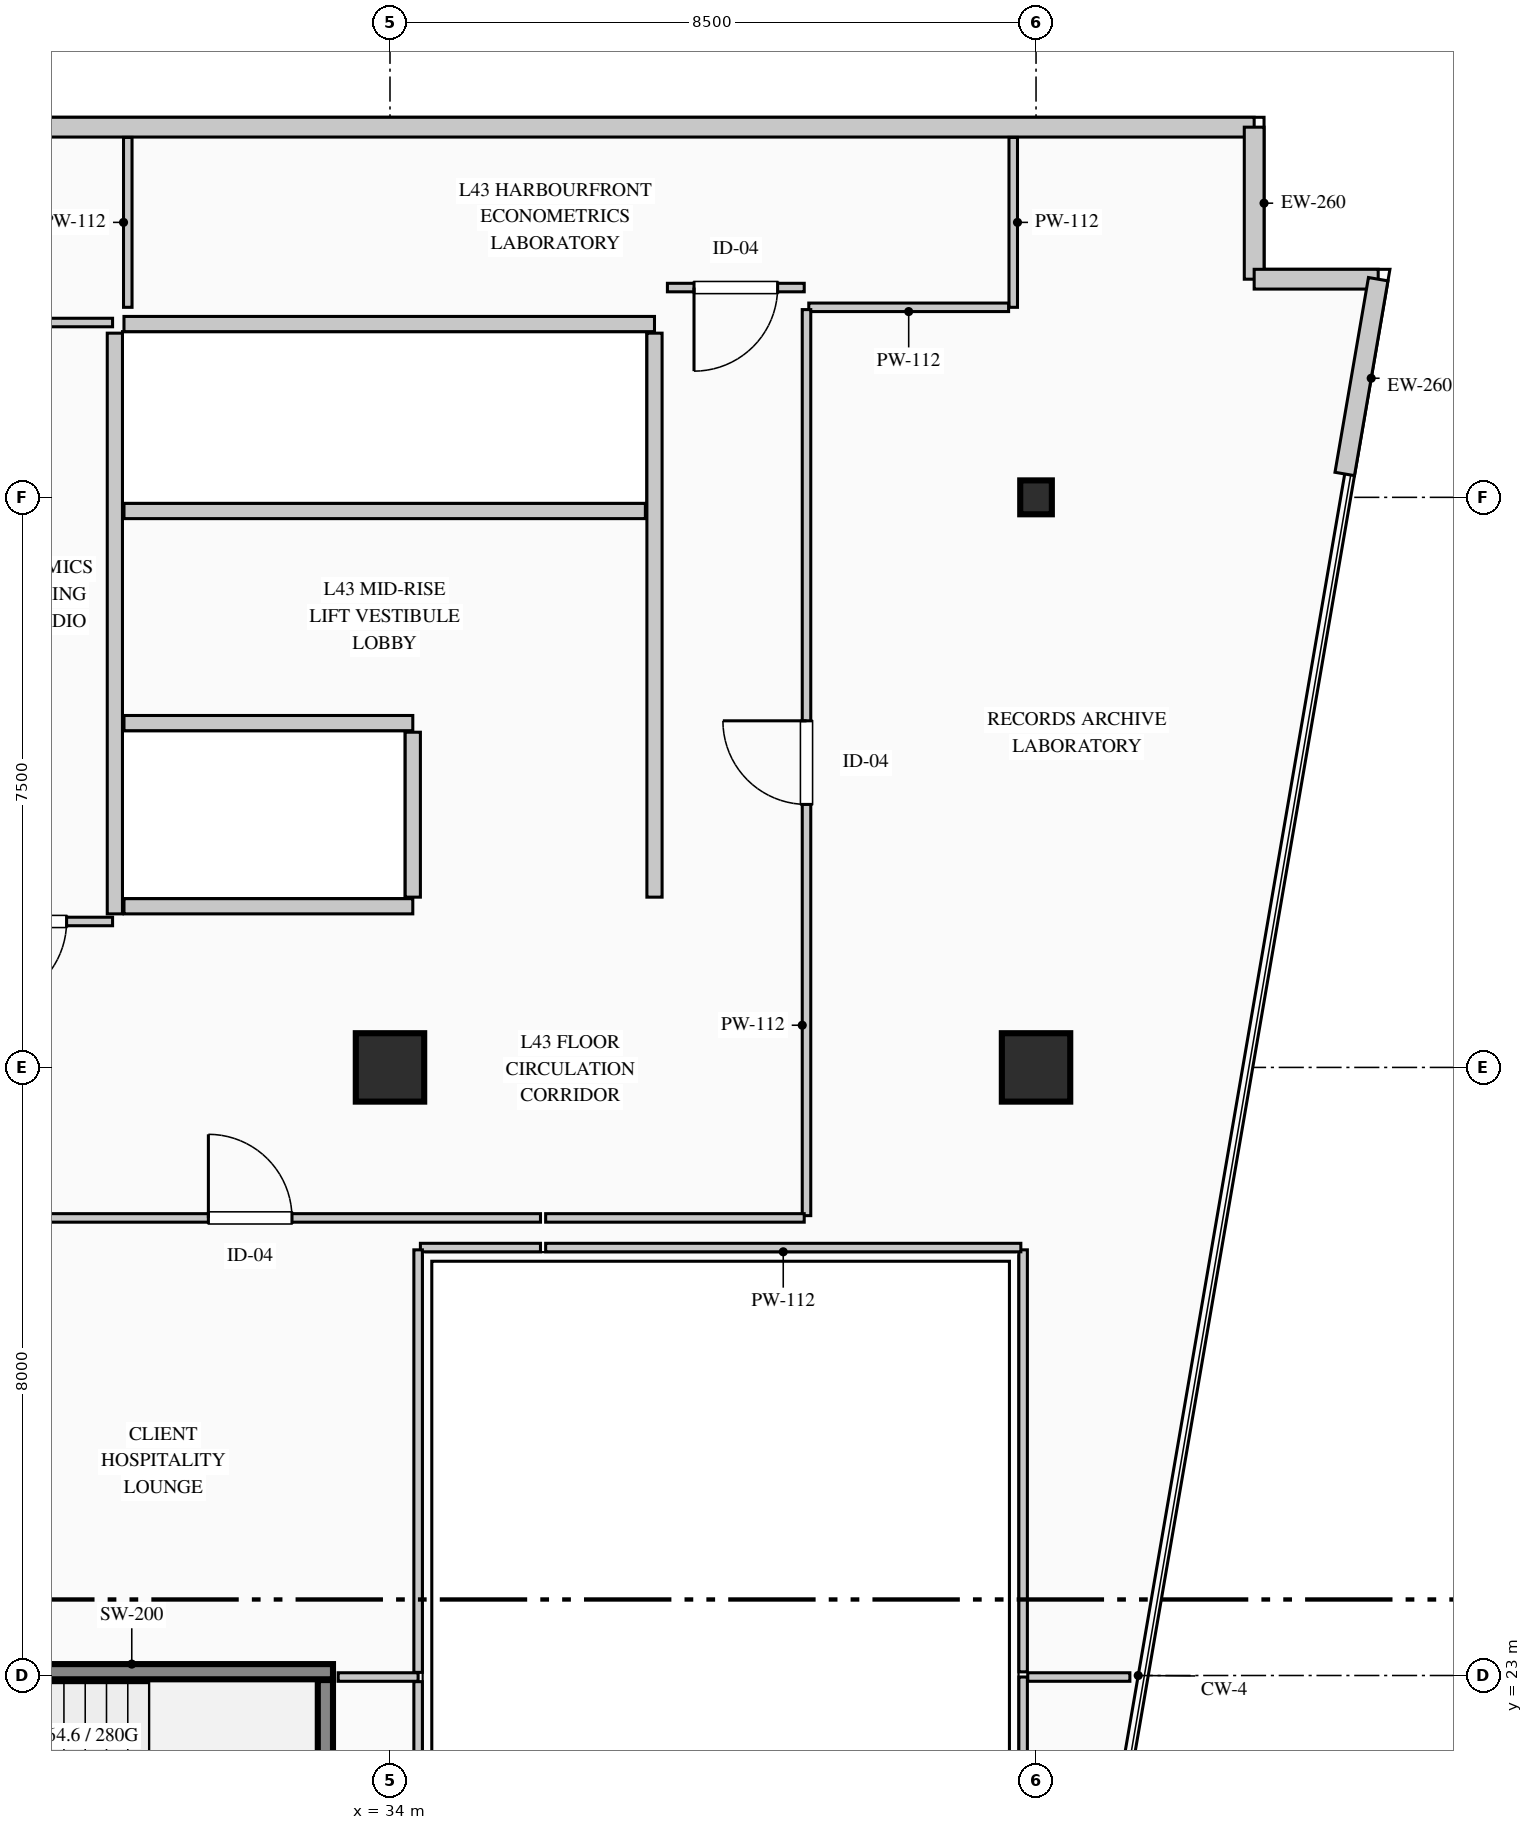
"""IFC4 building model, lengths in metres.
Left out: names, types, materials, properties, quantities, classifications, styles, units other than length and angle.
Written with IfcOpenShell. Run it as: python <this file> out.ifc"""

import sys

from ifc_helpers import new_model, si_unit, direction, frame, frame_2d, origin, origin_2d, place, context, subcontext, project, spatial, rectangle, i_section, extrude, element, fill, save


model = new_model("IFC4")
c1 = context("Model", 3, precision=1e-05, world=origin(), true_north=direction((0.0, 1.0)))
c2 = subcontext(c1, "Body", "Model", "MODEL_VIEW")
j1 = project(units=[si_unit("LENGTHUNIT", "METRE"), si_unit("PLANEANGLEUNIT", "RADIAN")], contexts=[c1])
p1 = place(None, origin())
s1 = spatial("IfcSite", under=j1, at=p1, CompositionType="ELEMENT")
p2 = place(p1, origin())
s2 = spatial("IfcBuilding", under=s1, at=p2, CompositionType="ELEMENT")
p3 = place(p2, frame((0.0, 0.0, 183.75)))
s3 = spatial("IfcBuildingStorey", under=s2, at=p3, CompositionType="ELEMENT", Elevation=183.75)
p4 = place(p3, frame((26.05, 23.05, 0.0), z_axis=(0.0, 0.0, 1.0), x_axis=(1.0, 0.0, 0.0)))
e1 = element("IfcWall", 1, at=p4, inside=s3, PredefinedType="SHEAR", context=c2, shape_type="SweptSolid", body=[
    extrude(rectangle(XDim=7.2, YDim=0.2, at=frame_2d((3.6, 0.0))), origin(), (0.0, 0.0, 1.0), 3.95),
])
p5 = place(p4, frame((0.38, 0.0, 0.0)))
e2 = element("IfcOpeningElement", 2, at=p5, cuts=e1, PredefinedType="OPENING", context=c2, shape_type="SweptSolid", body=[
    extrude(rectangle(XDim=1.15, YDim=2.2, at=frame_2d((0.575, 1.1))), frame((0.0, 0.11, 0.0), z_axis=(0.0, -1.0, 0.0), x_axis=(1.0, 0.0, 0.0)), (0.0, 0.0, 1.0), 0.22),
])
p6 = place(p3, frame((33.15, 19.81, 0.0), z_axis=(0.0, 0.0, 1.0), x_axis=(0.0, 1.0, 0.0)))
e3 = element("IfcWall", 3, at=p6, inside=s3, PredefinedType="SHEAR", context=c2, shape_type="SweptSolid", body=[
    extrude(rectangle(XDim=3.13, YDim=0.2, at=frame_2d((1.565, 0.0))), origin(), (0.0, 0.0, 1.0), 3.95),
])
for number, where, z_axis, x_axis in (
    (4, (34.0, 31.0, 0.0), (0.0, 0.0, 1.0), (1.0, 0.0, 0.0)),
    (5, (42.5, 31.0, 0.0), (0.0, 0.0, 1.0), (1.0, 0.0, 0.0)),
):
    element("IfcColumn", number, at=place(p3, frame(where, z_axis=z_axis, x_axis=x_axis)), inside=s3, PredefinedType="COLUMN", context=c2, shape_type="SweptSolid", body=[
        extrude(rectangle(XDim=0.9, YDim=0.9, at=origin_2d()), origin(), (0.0, 0.0, 1.0), 3.95),
    ])
p7 = place(p3, frame((42.5, 38.5, 0.0), z_axis=(0.0, 0.0, 1.0), x_axis=(1.0, 0.0, 0.0)))
e6 = element("IfcColumn", 6, at=p7, inside=s3, PredefinedType="COLUMN", context=c2, shape_type="SweptSolid", body=[
    extrude(i_section(OverallWidth=0.416, OverallDepth=0.446, WebThickness=0.039, FlangeThickness=0.063, FilletRadius=0.015, at=origin_2d()), origin(), (0.0, 0.0, 1.0), 3.95),
])
p8 = place(p3, frame((4.63, 43.37, 0.0), z_axis=(0.0, 0.0, 1.0), x_axis=(1.0, 0.0, 0.0)))
e7 = element("IfcWall", 7, at=p8, inside=s3, PredefinedType="STANDARD", context=c2, shape_type="SweptSolid", body=[
    extrude(rectangle(XDim=40.74, YDim=0.26, at=frame_2d((20.37, 0.0))), origin(), (0.0, 0.0, 1.0), 3.7),
])
p9 = place(p8, frame((13.316, 0.0, 0.9)))
e8 = element("IfcOpeningElement", 8, at=p9, cuts=e7, PredefinedType="OPENING", context=c2, shape_type="SweptSolid", body=[
    extrude(rectangle(XDim=2.7, YDim=2.1, at=frame_2d((1.35, 1.05))), frame((0.0, 0.14, 0.0), z_axis=(0.0, -1.0, 0.0), x_axis=(1.0, 0.0, 0.0)), (0.0, 0.0, 1.0), 0.28),
])
p10 = place(p3, frame((45.37, 43.37, 0.0), z_axis=(0.0, 0.0, 1.0), x_axis=(0.0, -1.0, 0.0)))
e9 = element("IfcWall", 9, at=p10, inside=s3, PredefinedType="STANDARD", context=c2, shape_type="SweptSolid", body=[
    extrude(rectangle(XDim=2.0, YDim=0.26, at=frame_2d((1.0, 0.0))), origin(), (0.0, 0.0, 1.0), 3.7),
])
p11 = place(p3, frame((45.37, 41.37, 0.0), z_axis=(0.0, 0.0, 1.0), x_axis=(1.0, 0.0, 0.0)))
e10 = element("IfcWall", 10, at=p11, inside=s3, PredefinedType="STANDARD", context=c2, shape_type="SweptSolid", body=[
    extrude(rectangle(XDim=1.632, YDim=0.26, at=frame_2d((0.816, 0.0))), origin(), (0.0, 0.0, 1.0), 3.7),
])
p12 = place(p3, frame((47.002, 41.37, 0.0), z_axis=(0.0, 0.0, 1.0), x_axis=(-0.169391215599, -0.98554889076, 0.0)))
e11 = element("IfcWall", 11, at=p12, inside=s3, PredefinedType="STANDARD", context=c2, shape_type="SweptSolid", body=[
    extrude(rectangle(XDim=2.6, YDim=0.26, at=frame_2d((1.3, 0.0))), origin(), (0.0, 0.0, 1.0), 3.7),
])
p13 = place(p3, frame((30.38, 33.02, 0.0), z_axis=(0.0, 0.0, 1.0), x_axis=(0.0, 1.0, 0.0)))
e12 = element("IfcWall", 12, at=p13, inside=s3, PredefinedType="PARTITIONING", context=c2, shape_type="SweptSolid", body=[
    extrude(rectangle(XDim=7.64, YDim=0.2, at=frame_2d((3.82, 0.0))), origin(), (0.0, 0.0, 1.0), 3.7),
])
p14 = place(p3, frame((30.5, 40.78, 0.0), z_axis=(0.0, 0.0, 1.0), x_axis=(1.0, 0.0, 0.0)))
e13 = element("IfcWall", 13, at=p14, inside=s3, PredefinedType="PARTITIONING", context=c2, shape_type="SweptSolid", body=[
    extrude(rectangle(XDim=6.98, YDim=0.2, at=frame_2d((3.49, 0.0))), origin(), (0.0, 0.0, 1.0), 3.7),
])
p15 = place(p3, frame((37.48, 33.24, 0.0), z_axis=(0.0, 0.0, 1.0), x_axis=(0.0, 1.0, 0.0)))
e14 = element("IfcWall", 14, at=p15, inside=s3, PredefinedType="PARTITIONING", context=c2, shape_type="SweptSolid", body=[
    extrude(rectangle(XDim=7.42, YDim=0.2, at=frame_2d((3.71, 0.0))), origin(), (0.0, 0.0, 1.0), 3.7),
])
p16 = place(p3, frame((30.5, 38.32, 0.0), z_axis=(0.0, 0.0, 1.0), x_axis=(1.0, 0.0, 0.0)))
e15 = element("IfcWall", 15, at=p16, inside=s3, PredefinedType="PARTITIONING", context=c2, shape_type="SweptSolid", body=[
    extrude(rectangle(XDim=6.86, YDim=0.2, at=frame_2d((3.43, 0.0))), origin(), (0.0, 0.0, 1.0), 3.7),
])
for number, where, z_axis, x_axis in (
    (16, (30.5, 35.53, 0.0), (0.0, 0.0, 1.0), (1.0, 0.0, 0.0)),
    (17, (30.5, 33.12, 0.0), (0.0, 0.0, 1.0), (1.0, 0.0, 0.0)),
):
    element("IfcWall", number, at=place(p3, frame(where, z_axis=z_axis, x_axis=x_axis)), inside=s3, PredefinedType="PARTITIONING", context=c2, shape_type="SweptSolid", body=[
        extrude(rectangle(XDim=3.8, YDim=0.2, at=frame_2d((1.9, 0.0))), origin(), (0.0, 0.0, 1.0), 3.7),
    ])
p17 = place(p3, frame((34.3, 33.24, 0.0), z_axis=(0.0, 0.0, 1.0), x_axis=(0.0, 1.0, 0.0)))
e18 = element("IfcWall", 18, at=p17, inside=s3, PredefinedType="PARTITIONING", context=c2, shape_type="SweptSolid", body=[
    extrude(rectangle(XDim=2.17, YDim=0.2, at=frame_2d((1.085, 0.0))), origin(), (0.0, 0.0, 1.0), 3.7),
])
p18 = place(p3, frame((30.35, 32.92, 0.0), z_axis=(0.0, 0.0, 1.0), x_axis=(-1.0, 0.0, 0.0)))
e19 = element("IfcWall", 19, at=p18, inside=s3, PredefinedType="PARTITIONING", context=c2, shape_type="SweptSolid", body=[
    extrude(rectangle(XDim=2.31, YDim=0.112, at=frame_2d((1.155, 0.0))), origin(), (0.0, 0.0, 1.0), 3.7),
])
p19 = place(p18, frame((0.605, 0.0, 0.0)))
e20 = element("IfcOpeningElement", 20, at=p19, cuts=e19, PredefinedType="OPENING", context=c2, shape_type="SweptSolid", body=[
    extrude(rectangle(XDim=1.1, YDim=2.2, at=frame_2d((0.55, 1.1))), frame((0.0, 0.066, 0.0), z_axis=(0.0, -1.0, 0.0), x_axis=(1.0, 0.0, 0.0)), (0.0, 0.0, 1.0), 0.132),
])
p20 = place(p3, frame((28.04, 40.8, 0.0), z_axis=(0.0, 0.0, 1.0), x_axis=(1.0, 0.0, 0.0)))
e21 = element("IfcWall", 21, at=p20, inside=s3, PredefinedType="PARTITIONING", context=c2, shape_type="SweptSolid", body=[
    extrude(rectangle(XDim=2.31, YDim=0.112, at=frame_2d((1.155, 0.0))), origin(), (0.0, 0.0, 1.0), 3.7),
])
p21 = place(p3, frame((39.45, 41.26, 0.0), z_axis=(0.0, 0.0, 1.0), x_axis=(-1.0, 0.0, 0.0)))
e22 = element("IfcWall", 22, at=p21, inside=s3, PredefinedType="PARTITIONING", context=c2, shape_type="SweptSolid", body=[
    extrude(rectangle(XDim=1.8, YDim=0.112, at=frame_2d((0.9, 0.0))), origin(), (0.0, 0.0, 1.0), 3.7),
])
p22 = place(p21, frame((0.35, 0.0, 0.0)))
e23 = element("IfcOpeningElement", 23, at=p22, cuts=e22, PredefinedType="OPENING", context=c2, shape_type="SweptSolid", body=[
    extrude(rectangle(XDim=1.1, YDim=2.2, at=frame_2d((0.55, 1.1))), frame((0.0, 0.066, 0.0), z_axis=(0.0, -1.0, 0.0), x_axis=(1.0, 0.0, 0.0)), (0.0, 0.0, 1.0), 0.132),
])
for number, where, z_axis, x_axis in (
    (24, (30.55, 41.0, 0.0), (0.0, 0.0, 1.0), (0.0, 1.0, 0.0)),
    (25, (42.2, 43.235, 0.0), (0.0, 0.0, 1.0), (0.0, -1.0, 0.0)),
):
    element("IfcWall", number, at=place(p3, frame(where, z_axis=z_axis, x_axis=x_axis)), inside=s3, PredefinedType="PARTITIONING", context=c2, shape_type="SweptSolid", body=[
        extrude(rectangle(XDim=2.235, YDim=0.112, at=frame_2d((1.118, 0.0))), origin(), (0.0, 0.0, 1.0), 3.7),
    ])
p23 = place(p3, frame((42.139, 41.0, 0.0), z_axis=(0.0, 0.0, 1.0), x_axis=(-1.0, 0.0, 0.0)))
e26 = element("IfcWall", 26, at=p23, inside=s3, PredefinedType="PARTITIONING", context=c2, shape_type="SweptSolid", body=[
    extrude(rectangle(XDim=2.629, YDim=0.112, at=frame_2d((1.314, 0.0))), origin(), (0.0, 0.0, 1.0), 3.7),
])
p24 = place(p3, frame((33.318, 22.98, 0.0), z_axis=(0.0, 0.0, 1.0), x_axis=(1.0, 0.0, 0.0)))
e27 = element("IfcWall", 27, at=p24, inside=s3, PredefinedType="PARTITIONING", context=c2, shape_type="SweptSolid", body=[
    extrude(rectangle(XDim=1.052, YDim=0.112, at=frame_2d((0.526, 0.0))), origin(), (0.0, 0.0, 1.0), 3.7),
])
p25 = place(p3, frame((34.37, 22.919, 0.0), z_axis=(0.0, 0.0, 1.0), x_axis=(0.0, -1.0, 0.0)))
e28 = element("IfcWall", 28, at=p25, inside=s3, PredefinedType="PARTITIONING", context=c2, shape_type="SweptSolid", body=[
    extrude(rectangle(XDim=3.299, YDim=0.112, at=frame_2d((1.649, 0.0))), origin(), (0.0, 0.0, 1.0), 3.7),
])
p26 = place(p3, frame((42.33, 19.681, 0.0), z_axis=(0.0, 0.0, 1.0), x_axis=(0.0, 1.0, 0.0)))
e29 = element("IfcWall", 29, at=p26, inside=s3, PredefinedType="PARTITIONING", context=c2, shape_type="SweptSolid", body=[
    extrude(rectangle(XDim=3.299, YDim=0.112, at=frame_2d((1.649, 0.0))), origin(), (0.0, 0.0, 1.0), 3.7),
])
p27 = place(p3, frame((42.391, 22.98, 0.0), z_axis=(0.0, 0.0, 1.0), x_axis=(1.0, 0.0, 0.0)))
e30 = element("IfcWall", 30, at=p27, inside=s3, PredefinedType="PARTITIONING", context=c2, shape_type="SweptSolid", body=[
    extrude(rectangle(XDim=1.344, YDim=0.112, at=frame_2d((0.672, 0.0))), origin(), (0.0, 0.0, 1.0), 3.7),
])
p28 = place(p3, frame((28.341, 29.02, 0.0), z_axis=(0.0, 0.0, 1.0), x_axis=(1.0, 0.0, 0.0)))
e31 = element("IfcWall", 31, at=p28, inside=s3, PredefinedType="PARTITIONING", context=c2, shape_type="SweptSolid", body=[
    extrude(rectangle(XDim=7.639, YDim=0.112, at=frame_2d((3.819, 0.0))), origin(), (0.0, 0.0, 1.0), 3.385),
])
p29 = place(p28, frame((3.27, 0.0, 0.0)))
e32 = element("IfcOpeningElement", 32, at=p29, cuts=e31, PredefinedType="OPENING", context=c2, shape_type="SweptSolid", body=[
    extrude(rectangle(XDim=1.1, YDim=2.2, at=frame_2d((0.55, 1.1))), frame((0.0, 0.066, 0.0), z_axis=(0.0, -1.0, 0.0), x_axis=(1.0, 0.0, 0.0)), (0.0, 0.0, 1.0), 0.132),
])
p30 = place(p3, frame((35.98, 28.63, 0.0), z_axis=(0.0, 0.0, 1.0), x_axis=(-1.0, 0.0, 0.0)))
e33 = element("IfcWall", 33, at=p30, inside=s3, PredefinedType="PARTITIONING", context=c2, shape_type="SweptSolid", body=[
    extrude(rectangle(XDim=1.58, YDim=0.112, at=frame_2d((0.79, 0.0))), origin(), (0.0, 0.0, 1.0), 3.7),
])
p31 = place(p3, frame((34.37, 28.6, 0.0), z_axis=(0.0, 0.0, 1.0), x_axis=(0.0, -1.0, 0.0)))
e34 = element("IfcWall", 34, at=p31, inside=s3, PredefinedType="PARTITIONING", context=c2, shape_type="SweptSolid", body=[
    extrude(rectangle(XDim=5.559, YDim=0.112, at=frame_2d((2.78, 0.0))), origin(), (0.0, 0.0, 1.0), 3.7),
])
p32 = place(p3, frame((39.48, 29.05, 0.0), z_axis=(0.0, 0.0, 1.0), x_axis=(0.0, 1.0, 0.0)))
e35 = element("IfcWall", 35, at=p32, inside=s3, PredefinedType="PARTITIONING", context=c2, shape_type="SweptSolid", body=[
    extrude(rectangle(XDim=11.92, YDim=0.112, at=frame_2d((5.96, 0.0))), origin(), (0.0, 0.0, 1.0), 3.7),
])
p33 = place(p32, frame((5.41, 0.0, 0.0)))
e36 = element("IfcOpeningElement", 36, at=p33, cuts=e35, PredefinedType="OPENING", context=c2, shape_type="SweptSolid", body=[
    extrude(rectangle(XDim=1.1, YDim=2.2, at=frame_2d((0.55, 1.1))), frame((0.0, 0.066, 0.0), z_axis=(0.0, -1.0, 0.0), x_axis=(1.0, 0.0, 0.0)), (0.0, 0.0, 1.0), 0.132),
])
p34 = place(p3, frame((42.33, 23.048, 0.0), z_axis=(0.0, 0.0, 1.0), x_axis=(0.0, 1.0, 0.0)))
e37 = element("IfcWall", 37, at=p34, inside=s3, PredefinedType="PARTITIONING", context=c2, shape_type="SweptSolid", body=[
    extrude(rectangle(XDim=5.552, YDim=0.112, at=frame_2d((2.776, 0.0))), origin(), (0.0, 0.0, 1.0), 3.7),
])
p35 = place(p3, frame((42.3, 28.63, 0.0), z_axis=(0.0, 0.0, 1.0), x_axis=(-1.0, 0.0, 0.0)))
e38 = element("IfcWall", 38, at=p35, inside=s3, PredefinedType="PARTITIONING", context=c2, shape_type="SweptSolid", body=[
    extrude(rectangle(XDim=6.252, YDim=0.112, at=frame_2d((3.126, 0.0))), origin(), (0.0, 0.0, 1.0), 3.7),
])
p36 = place(p3, frame((36.048, 29.02, 0.0), z_axis=(0.0, 0.0, 1.0), x_axis=(1.0, 0.0, 0.0)))
e39 = element("IfcWall", 39, at=p36, inside=s3, PredefinedType="PARTITIONING", context=c2, shape_type="SweptSolid", body=[
    extrude(rectangle(XDim=3.402, YDim=0.112, at=frame_2d((1.701, 0.0))), origin(), (0.0, 0.0, 1.0), 3.7),
])
p37 = place(p19, origin())
e40 = element("IfcDoor", 40, at=p37, inside=s3, OperationType="SINGLE_SWING_RIGHT", PredefinedType="DOOR", context=c2, shape_type="SweptSolid", body=[
    extrude(rectangle(XDim=1.1, YDim=2.2, at=frame_2d((0.55, 1.1))), frame((0.0, 0.025, 0.0), z_axis=(0.0, -1.0, 0.0), x_axis=(1.0, 0.0, 0.0)), (0.0, 0.0, 1.0), 0.05),
])
fill(e20, e40)
p38 = place(p22, origin())
e41 = element("IfcDoor", 41, at=p38, inside=s3, OperationType="SINGLE_SWING_RIGHT", PredefinedType="DOOR", context=c2, shape_type="SweptSolid", body=[
    extrude(rectangle(XDim=1.1, YDim=2.2, at=frame_2d((0.55, 1.1))), frame((0.0, 0.025, 0.0), z_axis=(0.0, -1.0, 0.0), x_axis=(1.0, 0.0, 0.0)), (0.0, 0.0, 1.0), 0.05),
])
fill(e23, e41)
p39 = place(p29, origin())
e42 = element("IfcDoor", 42, at=p39, inside=s3, OperationType="SINGLE_SWING_LEFT", PredefinedType="DOOR", context=c2, shape_type="SweptSolid", body=[
    extrude(rectangle(XDim=1.1, YDim=2.2, at=frame_2d((0.55, 1.1))), frame((0.0, 0.025, 0.0), z_axis=(0.0, -1.0, 0.0), x_axis=(1.0, 0.0, 0.0)), (0.0, 0.0, 1.0), 0.05),
])
fill(e32, e42)
p40 = place(p33, origin())
e43 = element("IfcDoor", 43, at=p40, inside=s3, OperationType="SINGLE_SWING_RIGHT", PredefinedType="DOOR", context=c2, shape_type="SweptSolid", body=[
    extrude(rectangle(XDim=1.1, YDim=2.2, at=frame_2d((0.55, 1.1))), frame((0.0, 0.025, 0.0), z_axis=(0.0, -1.0, 0.0), x_axis=(1.0, 0.0, 0.0)), (0.0, 0.0, 1.0), 0.05),
])
fill(e36, e43)
save(model, sys.argv[1])
